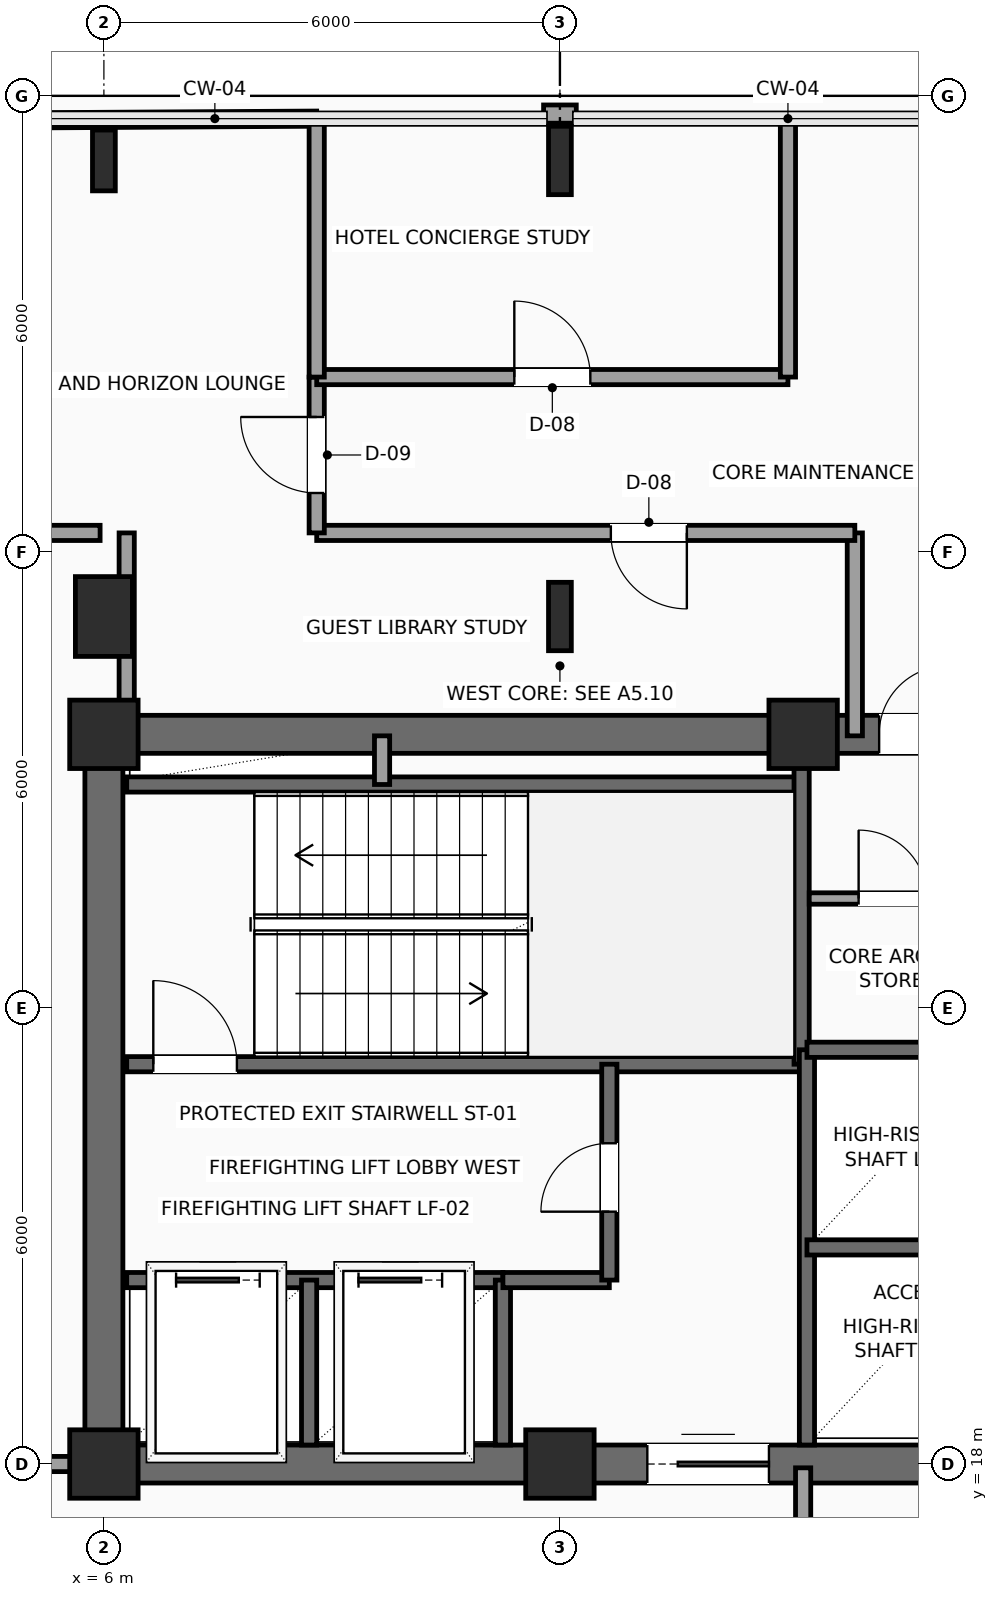
"""IFC4 building model, lengths in metres.
Left out: names, types, materials, properties, quantities, classifications, styles, units other than length and angle.
Written with IfcOpenShell. Run it as: python <this file> out.ifc"""

import sys

from ifc_helpers import new_model, si_unit, direction, frame, frame_2d, origin, origin_2d, place, context, subcontext, project, spatial, rectangle, i_section, extrude, element, fill, save


model = new_model("IFC4")
c1 = context("Model", 3, precision=1e-05, world=origin(), true_north=direction((0.0, 1.0)))
c2 = subcontext(c1, "Body", "Model", "MODEL_VIEW")
j1 = project(units=[si_unit("LENGTHUNIT", "METRE"), si_unit("PLANEANGLEUNIT", "RADIAN")], contexts=[c1])
p1 = place(None, origin())
s1 = spatial("IfcSite", under=j1, at=p1, CompositionType="ELEMENT")
p2 = place(p1, origin())
s2 = spatial("IfcBuilding", under=s1, at=p2, CompositionType="ELEMENT")
p3 = place(p2, frame((0.0, 0.0, 176.7)))
s3 = spatial("IfcBuildingStorey", under=s2, at=p3, CompositionType="ELEMENT", Elevation=176.7)
for number, where, z_axis, x_axis in (
    (1, (6.0, 18.0, 0.0), (0.0, 0.0, 1.0), (1.0, 0.0, 0.0)),
    (2, (12.0, 18.0, 0.0), (0.0, 0.0, 1.0), (1.0, 0.0, 0.0)),
    (3, (6.0, 27.6, 0.0), (0.0, 0.0, 1.0), (1.0, 0.0, 0.0)),
    (4, (15.2, 27.6, 0.0), (0.0, 0.0, 1.0), (1.0, 0.0, 0.0)),
):
    element("IfcColumn", number, at=place(p3, frame(where, z_axis=z_axis, x_axis=x_axis)), inside=s3, PredefinedType="COLUMN", context=c2, shape_type="SweptSolid", body=[
        extrude(rectangle(XDim=0.9, YDim=0.9, at=origin_2d()), origin(), (0.0, 0.0, 1.0), 3.75),
    ])
p4 = place(p3, frame((6.0, 29.15, 0.0), z_axis=(0.0, 0.0, 1.0), x_axis=(1.0, 0.0, 0.0)))
e5 = element("IfcColumn", 5, at=p4, inside=s3, PredefinedType="COLUMN", context=c2, shape_type="SweptSolid", body=[
    extrude(rectangle(XDim=0.75, YDim=1.05, at=origin_2d()), origin(), (0.0, 0.0, 1.0), 3.75),
])
p5 = place(p3, frame((6.0, 35.15, 0.0), z_axis=(0.0, 0.0, 1.0), x_axis=(1.0, 0.0, 0.0)))
e6 = element("IfcColumn", 6, at=p5, inside=s3, PredefinedType="COLUMN", context=c2, shape_type="SweptSolid", body=[
    extrude(i_section(OverallWidth=0.3, OverallDepth=0.8, WebThickness=0.018, FlangeThickness=0.033, FilletRadius=0.03, at=origin_2d()), origin(), (0.0, 0.0, 1.0), 3.75),
])
for number, where, z_axis, x_axis in (
    (7, (12.0, 29.15, 0.0), (0.0, 0.0, 1.0), (1.0, 0.0, 0.0)),
    (8, (12.0, 35.15, 0.0), (0.0, 0.0, 1.0), (1.0, 0.0, 0.0)),
):
    element("IfcColumn", number, at=place(p3, frame(where, z_axis=z_axis, x_axis=x_axis)), inside=s3, PredefinedType="COLUMN", context=c2, shape_type="SweptSolid", body=[
        extrude(i_section(OverallWidth=0.3, OverallDepth=0.9, WebThickness=0.019, FlangeThickness=0.035, FilletRadius=0.03, at=origin_2d()), origin(), (0.0, 0.0, 1.0), 3.75),
    ])
p6 = place(p3, frame((11.785, 35.76, 0.0), z_axis=(0.0, 0.0, 1.0), x_axis=(1.0, 0.0, 0.0)))
e9 = element("IfcWall", 9, at=p6, inside=s3, PredefinedType="SOLIDWALL", context=c2, shape_type="SweptSolid", body=[
    extrude(rectangle(XDim=0.43, YDim=0.24, at=frame_2d((0.215, 0.0))), origin(), (0.0, 0.0, 1.0), 3.54),
])
p7 = place(p3, frame((6.0, 18.0, 0.0), z_axis=(0.0, 0.0, 1.0), x_axis=(1.0, 0.0, 0.0)))
e10 = element("IfcWall", 10, at=p7, inside=s3, PredefinedType="SHEAR", context=c2, shape_type="SweptSolid", body=[
    extrude(rectangle(XDim=12.0, YDim=0.5, at=frame_2d((6.0, 0.0))), origin(), (0.0, 0.0, 1.0), 3.54),
])
p8 = place(p7, frame((7.15, 0.0, 0.0)))
e11 = element("IfcOpeningElement", 11, at=p8, cuts=e10, PredefinedType="OPENING", context=c2, shape_type="SweptSolid", body=[
    extrude(rectangle(XDim=1.6, YDim=2.3, at=frame_2d((0.8, 1.15))), frame((0.0, 0.26, 0.0), z_axis=(0.0, -1.0, 0.0), x_axis=(1.0, 0.0, 0.0)), (0.0, 0.0, 1.0), 0.52),
])
p9 = place(p3, frame((6.0, 27.6, 0.0), z_axis=(0.0, 0.0, 1.0), x_axis=(1.0, 0.0, 0.0)))
e12 = element("IfcWall", 12, at=p9, inside=s3, PredefinedType="SHEAR", context=c2, shape_type="SweptSolid", body=[
    extrude(rectangle(XDim=12.0, YDim=0.5, at=frame_2d((6.0, 0.0))), origin(), (0.0, 0.0, 1.0), 3.54),
])
p10 = place(p9, frame((10.2, 0.0, 0.0)))
e13 = element("IfcOpeningElement", 13, at=p10, cuts=e12, PredefinedType="OPENING", context=c2, shape_type="SweptSolid", body=[
    extrude(rectangle(XDim=0.9, YDim=2.15, at=frame_2d((0.45, 1.075))), frame((0.0, 0.26, 0.0), z_axis=(0.0, -1.0, 0.0), x_axis=(1.0, 0.0, 0.0)), (0.0, 0.0, 1.0), 0.52),
])
p11 = place(p3, frame((6.0, 18.0, 0.0), z_axis=(0.0, 0.0, 1.0), x_axis=(0.0, 1.0, 0.0)))
e14 = element("IfcWall", 14, at=p11, inside=s3, PredefinedType="SHEAR", context=c2, shape_type="SweptSolid", body=[
    extrude(rectangle(XDim=9.6, YDim=0.5, at=frame_2d((4.8, 0.0))), origin(), (0.0, 0.0, 1.0), 3.54),
])
p12 = place(p3, frame((6.3, 23.26, 0.0), z_axis=(0.0, 0.0, 1.0), x_axis=(1.0, 0.0, 0.0)))
e15 = element("IfcWall", 15, at=p12, inside=s3, PredefinedType="SHEAR", context=c2, shape_type="SweptSolid", body=[
    extrude(rectangle(XDim=8.88, YDim=0.2, at=frame_2d((4.44, 0.0))), origin(), (0.0, 0.0, 1.0), 3.54),
])
p13 = place(p12, frame((0.35, 0.0, 0.0)))
e16 = element("IfcOpeningElement", 16, at=p13, cuts=e15, PredefinedType="OPENING", context=c2, shape_type="SweptSolid", body=[
    extrude(rectangle(XDim=1.1, YDim=2.2, at=frame_2d((0.55, 1.1))), frame((0.0, 0.11, 0.0), z_axis=(0.0, -1.0, 0.0), x_axis=(1.0, 0.0, 0.0)), (0.0, 0.0, 1.0), 0.22),
])
p14 = place(p3, frame((6.3, 26.94, 0.0), z_axis=(0.0, 0.0, 1.0), x_axis=(1.0, 0.0, 0.0)))
e17 = element("IfcWall", 17, at=p14, inside=s3, PredefinedType="SHEAR", context=c2, shape_type="SweptSolid", body=[
    extrude(rectangle(XDim=8.88, YDim=0.2, at=frame_2d((4.44, 0.0))), origin(), (0.0, 0.0, 1.0), 3.54),
])
p15 = place(p3, frame((15.18, 23.26, 0.0), z_axis=(0.0, 0.0, 1.0), x_axis=(0.0, 1.0, 0.0)))
e18 = element("IfcWall", 18, at=p15, inside=s3, PredefinedType="SHEAR", context=c2, shape_type="SweptSolid", body=[
    extrude(rectangle(XDim=4.04, YDim=0.2, at=frame_2d((2.02, 0.0))), origin(), (0.0, 0.0, 1.0), 3.54),
])
p16 = place(p3, frame((6.3, 20.42, 0.0), z_axis=(0.0, 0.0, 1.0), x_axis=(1.0, 0.0, 0.0)))
e19 = element("IfcWall", 19, at=p16, inside=s3, PredefinedType="SHEAR", context=c2, shape_type="SweptSolid", body=[
    extrude(rectangle(XDim=4.95, YDim=0.2, at=frame_2d((2.475, 0.0))), origin(), (0.0, 0.0, 1.0), 3.54),
])
p17 = place(p16, frame((0.65, 0.0, 0.0)))
e20 = element("IfcOpeningElement", 20, at=p17, cuts=e19, PredefinedType="OPENING", context=c2, shape_type="SweptSolid", body=[
    extrude(rectangle(XDim=1.1, YDim=2.2, at=frame_2d((0.55, 1.1))), frame((0.0, 0.11, 0.0), z_axis=(0.0, -1.0, 0.0), x_axis=(1.0, 0.0, 0.0)), (0.0, 0.0, 1.0), 0.22),
])
p18 = place(p16, frame((3.05, 0.0, 0.0)))
e21 = element("IfcOpeningElement", 21, at=p18, cuts=e19, PredefinedType="OPENING", context=c2, shape_type="SweptSolid", body=[
    extrude(rectangle(XDim=1.1, YDim=2.2, at=frame_2d((0.55, 1.1))), frame((0.0, 0.11, 0.0), z_axis=(0.0, -1.0, 0.0), x_axis=(1.0, 0.0, 0.0)), (0.0, 0.0, 1.0), 0.22),
])
for number, where, z_axis, x_axis in (
    (22, (8.7, 18.25, 0.0), (0.0, 0.0, 1.0), (0.0, 1.0, 0.0)),
    (23, (11.25, 18.25, 0.0), (0.0, 0.0, 1.0), (0.0, 1.0, 0.0)),
):
    element("IfcWall", number, at=place(p3, frame(where, z_axis=z_axis, x_axis=x_axis)), inside=s3, PredefinedType="SHEAR", context=c2, shape_type="SweptSolid", body=[
        extrude(rectangle(XDim=2.17, YDim=0.2, at=frame_2d((1.085, 0.0))), origin(), (0.0, 0.0, 1.0), 3.54),
    ])
p19 = place(p3, frame((11.25, 20.42, 0.0), z_axis=(0.0, 0.0, 1.0), x_axis=(1.0, 0.0, 0.0)))
e24 = element("IfcWall", 24, at=p19, inside=s3, PredefinedType="SHEAR", context=c2, shape_type="SweptSolid", body=[
    extrude(rectangle(XDim=1.4, YDim=0.2, at=frame_2d((0.7, 0.0))), origin(), (0.0, 0.0, 1.0), 3.54),
])
p20 = place(p3, frame((12.65, 20.42, 0.0), z_axis=(0.0, 0.0, 1.0), x_axis=(0.0, 1.0, 0.0)))
e25 = element("IfcWall", 25, at=p20, inside=s3, PredefinedType="SHEAR", context=c2, shape_type="SweptSolid", body=[
    extrude(rectangle(XDim=2.84, YDim=0.2, at=frame_2d((1.42, 0.0))), origin(), (0.0, 0.0, 1.0), 3.54),
])
p21 = place(p20, frame((0.9, 0.0, 0.0)))
e26 = element("IfcOpeningElement", 26, at=p21, cuts=e25, PredefinedType="OPENING", context=c2, shape_type="SweptSolid", body=[
    extrude(rectangle(XDim=0.9, YDim=2.15, at=frame_2d((0.45, 1.075))), frame((0.0, 0.11, 0.0), z_axis=(0.0, -1.0, 0.0), x_axis=(1.0, 0.0, 0.0)), (0.0, 0.0, 1.0), 0.22),
])
p22 = place(p3, frame((9.66, 26.94, 0.0), z_axis=(0.0, 0.0, 1.0), x_axis=(0.0, 1.0, 0.0)))
e27 = element("IfcWall", 27, at=p22, inside=s3, PredefinedType="SOLIDWALL", context=c2, shape_type="SweptSolid", body=[
    extrude(rectangle(XDim=0.64, YDim=0.2, at=frame_2d((0.32, 0.0))), origin(), (0.0, 0.0, 1.0), 3.54),
])
p23 = place(p3, frame((15.25, 18.25, 0.0), z_axis=(0.0, 0.0, 1.0), x_axis=(0.0, 1.0, 0.0)))
e28 = element("IfcWall", 28, at=p23, inside=s3, PredefinedType="SHEAR", context=c2, shape_type="SweptSolid", body=[
    extrude(rectangle(XDim=5.2, YDim=0.2, at=frame_2d((2.6, 0.0))), origin(), (0.0, 0.0, 1.0), 3.54),
])
p24 = place(p3, frame((15.25, 20.85, 0.0), z_axis=(0.0, 0.0, 1.0), x_axis=(1.0, 0.0, 0.0)))
e29 = element("IfcWall", 29, at=p24, inside=s3, PredefinedType="SHEAR", context=c2, shape_type="SweptSolid", body=[
    extrude(rectangle(XDim=2.4, YDim=0.2, at=frame_2d((1.2, 0.0))), origin(), (0.0, 0.0, 1.0), 3.54),
])
p25 = place(p3, frame((15.25, 23.45, 0.0), z_axis=(0.0, 0.0, 1.0), x_axis=(1.0, 0.0, 0.0)))
e30 = element("IfcWall", 30, at=p25, inside=s3, PredefinedType="SHEAR", context=c2, shape_type="SweptSolid", body=[
    extrude(rectangle(XDim=2.45, YDim=0.2, at=frame_2d((1.225, 0.0))), origin(), (0.0, 0.0, 1.0), 3.54),
])
p26 = place(p3, frame((15.28, 25.44, 0.0), z_axis=(0.0, 0.0, 1.0), x_axis=(1.0, 0.0, 0.0)))
e31 = element("IfcWall", 31, at=p26, inside=s3, PredefinedType="PARTITIONING", context=c2, shape_type="SweptSolid", body=[
    extrude(rectangle(XDim=2.42, YDim=0.15, at=frame_2d((1.21, 0.0))), origin(), (0.0, 0.0, 1.0), 3.54),
])
p27 = place(p26, frame((0.65, 0.0, 0.0)))
e32 = element("IfcOpeningElement", 32, at=p27, cuts=e31, PredefinedType="OPENING", context=c2, shape_type="SweptSolid", body=[
    extrude(rectangle(XDim=0.9, YDim=2.15, at=frame_2d((0.45, 1.075))), frame((0.0, 0.085, 0.0), z_axis=(0.0, -1.0, 0.0), x_axis=(1.0, 0.0, 0.0)), (0.0, 0.0, 1.0), 0.17),
])
p28 = place(p3, frame((15.2, 17.95, 0.0), z_axis=(0.0, 0.0, 1.0), x_axis=(0.0, -1.0, 0.0)))
e33 = element("IfcWall", 33, at=p28, inside=s3, PredefinedType="PARTITIONING", context=c2, shape_type="SweptSolid", body=[
    extrude(rectangle(XDim=1.7, YDim=0.2, at=frame_2d((0.85, 0.0))), origin(), (0.0, 0.0, 1.0), 3.54),
])
p29 = place(p3, frame((15.88, 27.58, 0.0), z_axis=(0.0, 0.0, 1.0), x_axis=(0.0, 1.0, 0.0)))
e34 = element("IfcWall", 34, at=p29, inside=s3, PredefinedType="PARTITIONING", context=c2, shape_type="SweptSolid", body=[
    extrude(rectangle(XDim=2.67, YDim=0.2, at=frame_2d((1.335, 0.0))), origin(), (0.0, 0.0, 1.0), 3.54),
])
p30 = place(p3, frame((15.88, 30.25, 0.0), z_axis=(0.0, 0.0, 1.0), x_axis=(-1.0, 0.0, 0.0)))
e35 = element("IfcWall", 35, at=p30, inside=s3, PredefinedType="PARTITIONING", context=c2, shape_type="SweptSolid", body=[
    extrude(rectangle(XDim=7.08, YDim=0.2, at=frame_2d((3.54, 0.0))), origin(), (0.0, 0.0, 1.0), 3.54),
])
p31 = place(p30, frame((2.21, 0.0, 0.0)))
e36 = element("IfcOpeningElement", 36, at=p31, cuts=e35, PredefinedType="OPENING", context=c2, shape_type="SweptSolid", body=[
    extrude(rectangle(XDim=1.0, YDim=2.2, at=frame_2d((0.5, 1.1))), frame((0.0, 0.11, 0.0), z_axis=(0.0, -1.0, 0.0), x_axis=(1.0, 0.0, 0.0)), (0.0, 0.0, 1.0), 0.22),
])
p32 = place(p3, frame((8.8, 30.25, 0.0), z_axis=(0.0, 0.0, 1.0), x_axis=(0.0, 1.0, 0.0)))
e37 = element("IfcWall", 37, at=p32, inside=s3, PredefinedType="PARTITIONING", context=c2, shape_type="SweptSolid", body=[
    extrude(rectangle(XDim=2.05, YDim=0.2, at=frame_2d((1.025, 0.0))), origin(), (0.0, 0.0, 1.0), 3.54),
])
p33 = place(p32, frame((0.525, 0.0, 0.0)))
e38 = element("IfcOpeningElement", 38, at=p33, cuts=e37, PredefinedType="OPENING", context=c2, shape_type="SweptSolid", body=[
    extrude(rectangle(XDim=1.0, YDim=2.2, at=frame_2d((0.5, 1.1))), frame((0.0, 0.11, 0.0), z_axis=(0.0, -1.0, 0.0), x_axis=(1.0, 0.0, 0.0)), (0.0, 0.0, 1.0), 0.22),
])
p34 = place(p3, frame((8.8, 32.3, 0.0), z_axis=(0.0, 0.0, 1.0), x_axis=(1.0, 0.0, 0.0)))
e39 = element("IfcWall", 39, at=p34, inside=s3, PredefinedType="PARTITIONING", context=c2, shape_type="SweptSolid", body=[
    extrude(rectangle(XDim=6.2, YDim=0.2, at=frame_2d((3.1, 0.0))), origin(), (0.0, 0.0, 1.0), 3.132),
])
p35 = place(p34, frame((2.6, 0.0, 0.0)))
e40 = element("IfcOpeningElement", 40, at=p35, cuts=e39, PredefinedType="OPENING", context=c2, shape_type="SweptSolid", body=[
    extrude(rectangle(XDim=1.0, YDim=2.2, at=frame_2d((0.5, 1.1))), frame((0.0, 0.11, 0.0), z_axis=(0.0, -1.0, 0.0), x_axis=(1.0, 0.0, 0.0)), (0.0, 0.0, 1.0), 0.22),
])
p36 = place(p3, frame((15.0, 32.3, 0.0), z_axis=(0.0, 0.0, 1.0), x_axis=(0.0, 1.0, 0.0)))
e41 = element("IfcWall", 41, at=p36, inside=s3, PredefinedType="PARTITIONING", context=c2, shape_type="SweptSolid", body=[
    extrude(rectangle(XDim=3.4, YDim=0.2, at=frame_2d((1.7, 0.0))), origin(), (0.0, 0.0, 1.0), 3.54),
])
p37 = place(p3, frame((0.3, 18.0, 0.0), z_axis=(0.0, 0.0, 1.0), x_axis=(1.0, 0.0, 0.0)))
e42 = element("IfcWall", 42, at=p37, inside=s3, PredefinedType="PARTITIONING", context=c2, shape_type="SweptSolid", body=[
    extrude(rectangle(XDim=5.65, YDim=0.2, at=frame_2d((2.825, 0.0))), origin(), (0.0, 0.0, 1.0), 3.132),
])
p38 = place(p37, frame((2.35, 0.0, 0.0)))
e43 = element("IfcOpeningElement", 43, at=p38, cuts=e42, PredefinedType="OPENING", context=c2, shape_type="SweptSolid", body=[
    extrude(rectangle(XDim=1.0, YDim=2.2, at=frame_2d((0.5, 1.1))), frame((0.0, 0.11, 0.0), z_axis=(0.0, -1.0, 0.0), x_axis=(1.0, 0.0, 0.0)), (0.0, 0.0, 1.0), 0.22),
])
p39 = place(p3, frame((0.3, 30.25, 0.0), z_axis=(0.0, 0.0, 1.0), x_axis=(1.0, 0.0, 0.0)))
e44 = element("IfcWall", 44, at=p39, inside=s3, PredefinedType="PARTITIONING", context=c2, shape_type="SweptSolid", body=[
    extrude(rectangle(XDim=5.65, YDim=0.2, at=frame_2d((2.825, 0.0))), origin(), (0.0, 0.0, 1.0), 3.54),
])
p40 = place(p3, frame((6.3, 27.65, 0.0), z_axis=(0.0, 0.0, 1.0), x_axis=(0.0, 1.0, 0.0)))
e45 = element("IfcWall", 45, at=p40, inside=s3, PredefinedType="PARTITIONING", context=c2, shape_type="SweptSolid", body=[
    extrude(rectangle(XDim=2.6, YDim=0.2, at=frame_2d((1.3, 0.0))), origin(), (0.0, 0.0, 1.0), 3.132),
])
p41 = place(p3, frame((0.35, 35.65, 0.0), z_axis=(0.0, 0.0, 1.0), x_axis=(0.99998245966, 0.005922868574, 0.0)))
e46 = element("IfcWall", 46, at=p41, inside=s3, PredefinedType="PARTITIONING", context=c2, shape_type="SweptSolid", body=[
    extrude(rectangle(XDim=8.45, YDim=0.2, at=frame_2d((4.225, 0.0))), origin(), (0.0, 0.0, 1.0), 3.54),
])
p42 = place(p3, frame((8.8, 32.3, 0.0), z_axis=(0.0, 0.0, 1.0), x_axis=(0.0, 1.0, 0.0)))
e47 = element("IfcWall", 47, at=p42, inside=s3, PredefinedType="PARTITIONING", context=c2, shape_type="SweptSolid", body=[
    extrude(rectangle(XDim=3.4, YDim=0.2, at=frame_2d((1.7, 0.0))), origin(), (0.0, 0.0, 1.0), 3.54),
])
p43 = place(p8, origin())
e48 = element("IfcDoor", 48, at=p43, inside=s3, OperationType="DOUBLE_DOOR_SLIDING", PredefinedType="DOOR", context=c2, shape_type="SweptSolid", body=[
    extrude(rectangle(XDim=1.6, YDim=2.3, at=frame_2d((0.8, 1.15))), frame((0.0, 0.025, 0.0), z_axis=(0.0, -1.0, 0.0), x_axis=(1.0, 0.0, 0.0)), (0.0, 0.0, 1.0), 0.05),
])
fill(e11, e48)
p44 = place(p10, origin())
e49 = element("IfcDoor", 49, at=p44, inside=s3, OperationType="SINGLE_SWING_RIGHT", PredefinedType="DOOR", context=c2, shape_type="SweptSolid", body=[
    extrude(rectangle(XDim=0.9, YDim=2.15, at=frame_2d((0.45, 1.075))), frame((0.0, 0.025, 0.0), z_axis=(0.0, -1.0, 0.0), x_axis=(1.0, 0.0, 0.0)), (0.0, 0.0, 1.0), 0.05),
])
fill(e13, e49)
p45 = place(p13, origin())
e50 = element("IfcDoor", 50, at=p45, inside=s3, OperationType="SINGLE_SWING_LEFT", PredefinedType="DOOR", context=c2, shape_type="SweptSolid", body=[
    extrude(rectangle(XDim=1.1, YDim=2.2, at=frame_2d((0.55, 1.1))), frame((0.0, 0.025, 0.0), z_axis=(0.0, -1.0, 0.0), x_axis=(1.0, 0.0, 0.0)), (0.0, 0.0, 1.0), 0.05),
])
fill(e16, e50)
p46 = place(p17, origin())
e51 = element("IfcDoor", 51, at=p46, inside=s3, OperationType="SLIDING_TO_LEFT", PredefinedType="DOOR", context=c2, shape_type="SweptSolid", body=[
    extrude(rectangle(XDim=1.1, YDim=2.2, at=frame_2d((0.55, 1.1))), frame((0.0, 0.025, 0.0), z_axis=(0.0, -1.0, 0.0), x_axis=(1.0, 0.0, 0.0)), (0.0, 0.0, 1.0), 0.05),
])
fill(e20, e51)
p47 = place(p18, origin())
e52 = element("IfcDoor", 52, at=p47, inside=s3, OperationType="SLIDING_TO_LEFT", PredefinedType="DOOR", context=c2, shape_type="SweptSolid", body=[
    extrude(rectangle(XDim=1.1, YDim=2.2, at=frame_2d((0.55, 1.1))), frame((0.0, 0.025, 0.0), z_axis=(0.0, -1.0, 0.0), x_axis=(1.0, 0.0, 0.0)), (0.0, 0.0, 1.0), 0.05),
])
fill(e21, e52)
p48 = place(p21, origin())
e53 = element("IfcDoor", 53, at=p48, inside=s3, OperationType="SINGLE_SWING_LEFT", PredefinedType="DOOR", context=c2, shape_type="SweptSolid", body=[
    extrude(rectangle(XDim=0.9, YDim=2.15, at=frame_2d((0.45, 1.075))), frame((0.0, 0.025, 0.0), z_axis=(0.0, -1.0, 0.0), x_axis=(1.0, 0.0, 0.0)), (0.0, 0.0, 1.0), 0.05),
])
fill(e26, e53)
p49 = place(p27, origin())
e54 = element("IfcDoor", 54, at=p49, inside=s3, OperationType="SINGLE_SWING_LEFT", PredefinedType="DOOR", context=c2, shape_type="SweptSolid", body=[
    extrude(rectangle(XDim=0.9, YDim=2.15, at=frame_2d((0.45, 1.075))), frame((0.0, 0.025, 0.0), z_axis=(0.0, -1.0, 0.0), x_axis=(1.0, 0.0, 0.0)), (0.0, 0.0, 1.0), 0.05),
])
fill(e32, e54)
p50 = place(p31, origin())
e55 = element("IfcDoor", 55, at=p50, inside=s3, OperationType="SINGLE_SWING_LEFT", PredefinedType="DOOR", context=c2, shape_type="SweptSolid", body=[
    extrude(rectangle(XDim=1.0, YDim=2.2, at=frame_2d((0.5, 1.1))), frame((0.0, 0.025, 0.0), z_axis=(0.0, -1.0, 0.0), x_axis=(1.0, 0.0, 0.0)), (0.0, 0.0, 1.0), 0.05),
])
fill(e36, e55)
p51 = place(p33, origin())
e56 = element("IfcDoor", 56, at=p51, inside=s3, OperationType="SINGLE_SWING_RIGHT", PredefinedType="DOOR", context=c2, shape_type="SweptSolid", body=[
    extrude(rectangle(XDim=1.0, YDim=2.2, at=frame_2d((0.5, 1.1))), frame((0.0, 0.025, 0.0), z_axis=(0.0, -1.0, 0.0), x_axis=(1.0, 0.0, 0.0)), (0.0, 0.0, 1.0), 0.05),
])
fill(e38, e56)
p52 = place(p35, origin())
e57 = element("IfcDoor", 57, at=p52, inside=s3, OperationType="SINGLE_SWING_LEFT", PredefinedType="DOOR", context=c2, shape_type="SweptSolid", body=[
    extrude(rectangle(XDim=1.0, YDim=2.2, at=frame_2d((0.5, 1.1))), frame((0.0, 0.025, 0.0), z_axis=(0.0, -1.0, 0.0), x_axis=(1.0, 0.0, 0.0)), (0.0, 0.0, 1.0), 0.05),
])
fill(e40, e57)
save(model, sys.argv[1])
